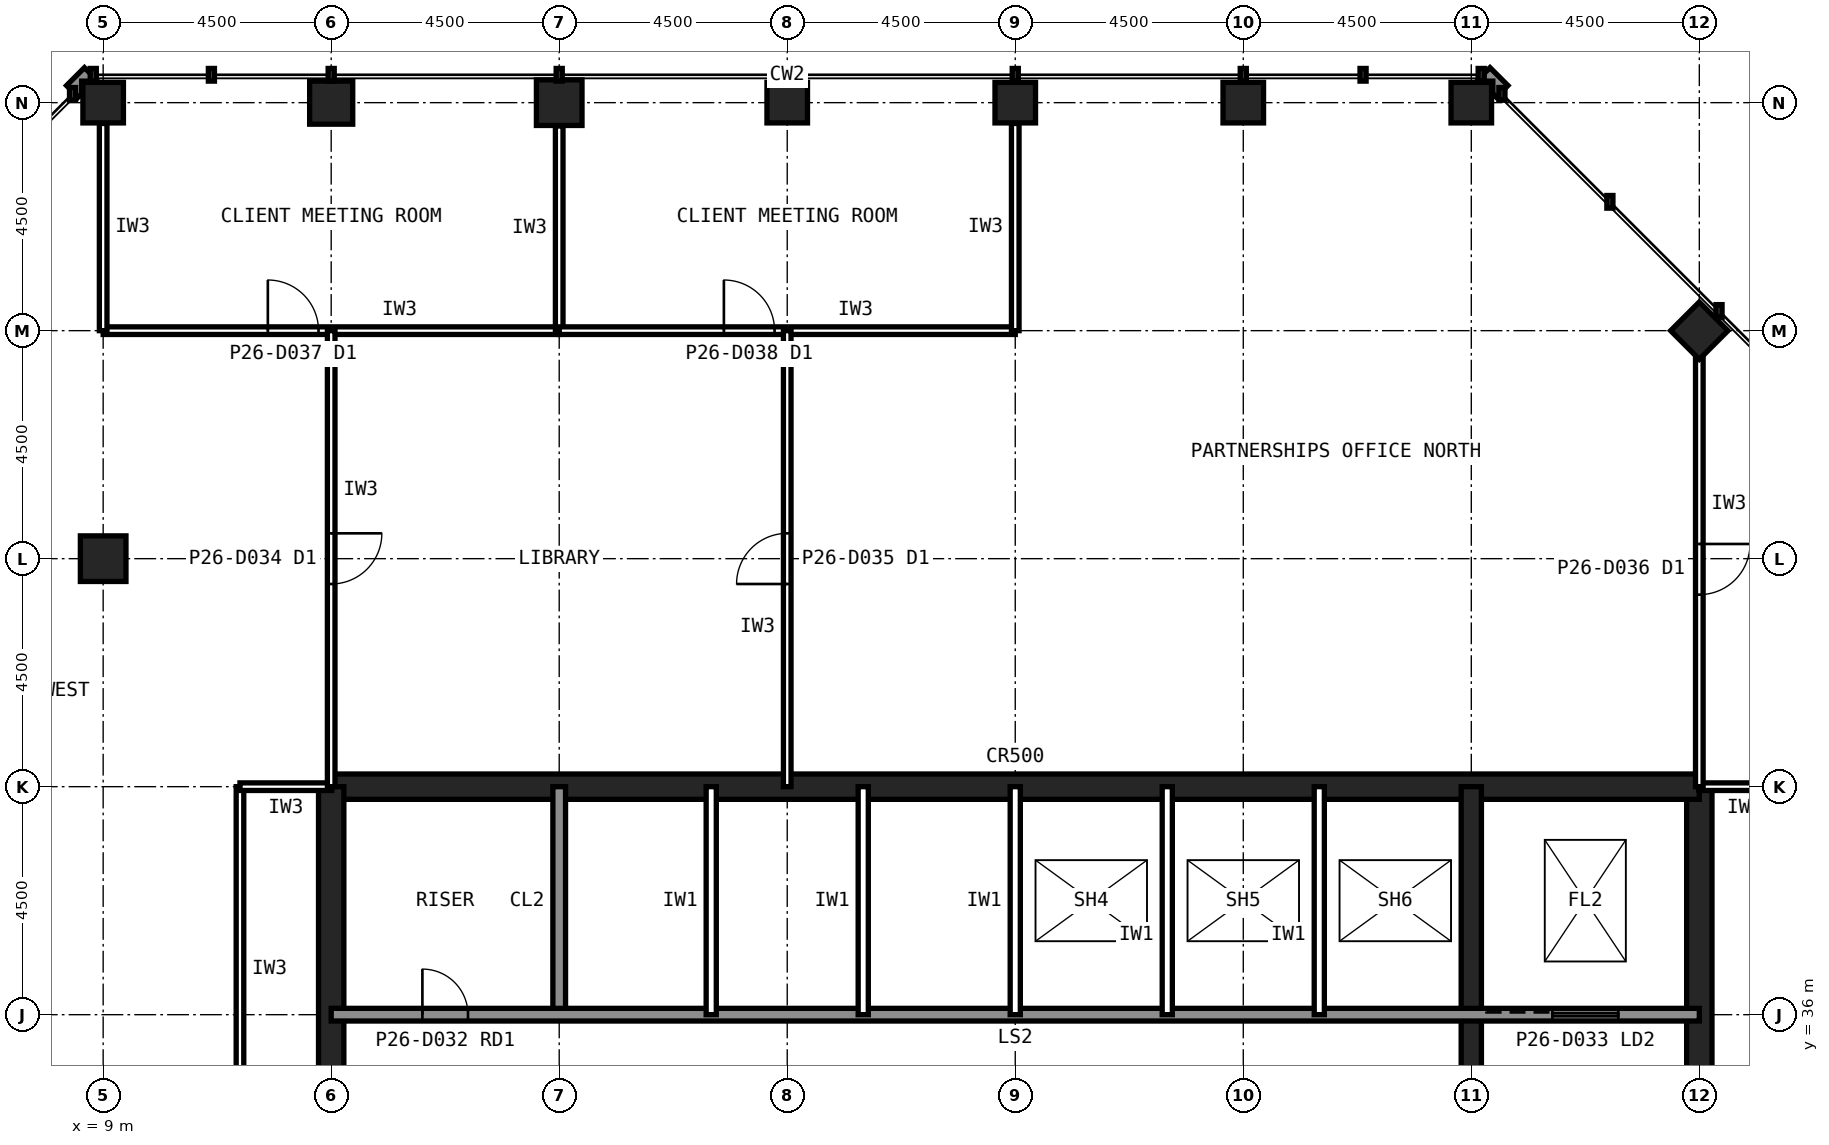
"""IFC4 building model, lengths in metres.
Left out: names, types, materials, properties, quantities, classifications, styles, units other than length and angle.
Written with IfcOpenShell. Run it as: python <this file> out.ifc"""

import sys

from ifc_helpers import new_model, si_unit, direction, frame, frame_2d, origin, origin_2d, place, context, subcontext, project, spatial, rectangle, hollow_rectangle, extrude, element, fill, save


model = new_model("IFC4")
c1 = context("Model", 3, precision=1e-05, world=origin(), true_north=direction((0.0, 1.0)))
c2 = subcontext(c1, "Body", "Model", "MODEL_VIEW")
j1 = project(units=[si_unit("LENGTHUNIT", "METRE"), si_unit("PLANEANGLEUNIT", "RADIAN")], contexts=[c1])
p1 = place(None, origin())
s1 = spatial("IfcSite", under=j1, at=p1, CompositionType="ELEMENT")
p2 = place(p1, origin())
s2 = spatial("IfcBuilding", under=s1, at=p2, CompositionType="ELEMENT")
p3 = place(p2, frame((0.0, 0.0, 115.6)))
s3 = spatial("IfcBuildingStorey", under=s2, at=p3, CompositionType="ELEMENT", Elevation=115.6)
for number, where, z_axis, x_axis in (
    (1, (36.0, 54.0, 0.0), (0.0, 0.0, 1.0), (1.0, 0.0, 0.0)),
    (2, (31.5, 54.0, 0.0), (0.0, 0.0, 1.0), (1.0, 0.0, 0.0)),
    (3, (27.0, 54.0, 0.0), (0.0, 0.0, 1.0), (1.0, 0.0, 0.0)),
    (4, (22.5, 54.0, 0.0), (0.0, 0.0, 1.0), (1.0, 0.0, 0.0)),
):
    element("IfcColumn", number, at=place(p3, frame(where, z_axis=z_axis, x_axis=x_axis)), inside=s3, PredefinedType="COLUMN", context=c2, shape_type="SweptSolid", body=[
        extrude(hollow_rectangle(XDim=0.8, YDim=0.8, WallThickness=0.045, at=origin_2d()), origin(), (0.0, 0.0, 1.0), 4.0),
    ])
p4 = place(p3, frame((18.0, 54.0, 0.0), z_axis=(0.0, 0.0, 1.0), x_axis=(1.0, 0.0, 0.0)))
e5 = element("IfcColumn", 5, at=p4, inside=s3, PredefinedType="COLUMN", context=c2, shape_type="SweptSolid", body=[
    extrude(hollow_rectangle(XDim=0.9, YDim=0.9, WallThickness=0.063, at=origin_2d()), origin(), (0.0, 0.0, 1.0), 4.0),
])
p5 = place(p3, frame((13.5, 54.0, 0.0), z_axis=(0.0, 0.0, 1.0), x_axis=(1.0, 0.0, 0.0)))
e6 = element("IfcColumn", 6, at=p5, inside=s3, PredefinedType="COLUMN", context=c2, shape_type="SweptSolid", body=[
    extrude(hollow_rectangle(XDim=0.85, YDim=0.85, WallThickness=0.05, at=origin_2d()), origin(), (0.0, 0.0, 1.0), 4.0),
])
for number, where, z_axis, x_axis in (
    (7, (9.0, 54.0, 0.0), (0.0, 0.0, 1.0), (1.0, 0.0, 0.0)),
    (8, (40.5, 49.5, 0.0), (0.0, 0.0, 1.0), (0.707, 0.707, 0.0)),
):
    element("IfcColumn", number, at=place(p3, frame(where, z_axis=z_axis, x_axis=x_axis)), inside=s3, PredefinedType="COLUMN", context=c2, shape_type="SweptSolid", body=[
        extrude(hollow_rectangle(XDim=0.8, YDim=0.8, WallThickness=0.045, at=origin_2d()), origin(), (0.0, 0.0, 1.0), 4.0),
    ])
p6 = place(p3, frame((9.0, 45.0, 0.0), z_axis=(0.0, 0.0, 1.0), x_axis=(1.0, 0.0, 0.0)))
e9 = element("IfcColumn", 9, at=p6, inside=s3, PredefinedType="COLUMN", context=c2, shape_type="SweptSolid", body=[
    extrude(hollow_rectangle(XDim=0.9, YDim=0.9, WallThickness=0.063, at=origin_2d()), origin(), (0.0, 0.0, 1.0), 4.0),
])
p7 = place(p3, frame((40.5, 13.5, 0.0), z_axis=(0.0, 0.0, 1.0), x_axis=(0.0, 1.0, 0.0)))
e10 = element("IfcWall", 10, at=p7, inside=s3, PredefinedType="SHEAR", context=c2, shape_type="SweptSolid", body=[
    extrude(rectangle(XDim=27.0, YDim=0.5, at=frame_2d((13.5, 0.0))), origin(), (0.0, 0.0, 1.0), 4.0),
])
p8 = place(p7, frame((5.85, 0.0, 0.0)))
e11 = element("IfcOpeningElement", 11, at=p8, cuts=e10, PredefinedType="OPENING", context=c2, shape_type="SweptSolid", body=[
    extrude(rectangle(XDim=1.8, YDim=2.1, at=frame_2d((0.9, 1.05))), frame((0.0, 0.26, 0.0), z_axis=(0.0, -1.0, 0.0), x_axis=(1.0, 0.0, 0.0)), (0.0, 0.0, 1.0), 0.52),
])
p9 = place(p7, frame((19.65, 0.0, 0.0)))
e12 = element("IfcOpeningElement", 12, at=p9, cuts=e10, PredefinedType="OPENING", context=c2, shape_type="SweptSolid", body=[
    extrude(rectangle(XDim=1.2, YDim=2.1, at=frame_2d((0.6, 1.05))), frame((0.0, 0.26, 0.0), z_axis=(0.0, -1.0, 0.0), x_axis=(1.0, 0.0, 0.0)), (0.0, 0.0, 1.0), 0.52),
])
p10 = place(p3, frame((40.5, 40.5, 0.0), z_axis=(0.0, 0.0, 1.0), x_axis=(-1.0, 0.0, 0.0)))
e13 = element("IfcWall", 13, at=p10, inside=s3, PredefinedType="SHEAR", context=c2, shape_type="SweptSolid", body=[
    extrude(rectangle(XDim=27.0, YDim=0.5, at=frame_2d((13.5, 0.0))), origin(), (0.0, 0.0, 1.0), 4.0),
])
p11 = place(p3, frame((13.5, 40.5, 0.0), z_axis=(0.0, 0.0, 1.0), x_axis=(0.0, -1.0, 0.0)))
e14 = element("IfcWall", 14, at=p11, inside=s3, PredefinedType="SHEAR", context=c2, shape_type="SweptSolid", body=[
    extrude(rectangle(XDim=27.0, YDim=0.5, at=frame_2d((13.5, 0.0))), origin(), (0.0, 0.0, 1.0), 4.0),
])
p12 = place(p11, frame((19.65, 0.0, 0.0)))
e15 = element("IfcOpeningElement", 15, at=p12, cuts=e14, PredefinedType="OPENING", context=c2, shape_type="SweptSolid", body=[
    extrude(rectangle(XDim=1.2, YDim=2.1, at=frame_2d((0.6, 1.05))), frame((0.0, 0.26, 0.0), z_axis=(0.0, -1.0, 0.0), x_axis=(1.0, 0.0, 0.0)), (0.0, 0.0, 1.0), 0.52),
])
p13 = place(p11, frame((5.85, 0.0, 0.0)))
e16 = element("IfcOpeningElement", 16, at=p13, cuts=e14, PredefinedType="OPENING", context=c2, shape_type="SweptSolid", body=[
    extrude(rectangle(XDim=1.8, YDim=2.1, at=frame_2d((0.9, 1.05))), frame((0.0, 0.26, 0.0), z_axis=(0.0, -1.0, 0.0), x_axis=(1.0, 0.0, 0.0)), (0.0, 0.0, 1.0), 0.52),
])
p14 = place(p3, frame((18.0, 36.0, 0.0), z_axis=(0.0, 0.0, 1.0), x_axis=(0.0, 1.0, 0.0)))
e17 = element("IfcWall", 17, at=p14, inside=s3, PredefinedType="SOLIDWALL", context=c2, shape_type="SweptSolid", body=[
    extrude(rectangle(XDim=4.5, YDim=0.25, at=frame_2d((2.25, 0.0))), origin(), (0.0, 0.0, 1.0), 3.84),
])
p15 = place(p3, frame((36.0, 22.5, 0.0), z_axis=(0.0, 0.0, 1.0), x_axis=(0.0, 1.0, 0.0)))
e18 = element("IfcWall", 18, at=p15, inside=s3, PredefinedType="SHEAR", context=c2, shape_type="SweptSolid", body=[
    extrude(rectangle(XDim=18.0, YDim=0.4, at=frame_2d((9.0, 0.0))), origin(), (0.0, 0.0, 1.0), 4.0),
])
p16 = place(p3, frame((13.5, 36.0, 0.0), z_axis=(0.0, 0.0, 1.0), x_axis=(1.0, 0.0, 0.0)))
e19 = element("IfcWall", 19, at=p16, inside=s3, PredefinedType="SOLIDWALL", context=c2, shape_type="SweptSolid", body=[
    extrude(rectangle(XDim=27.0, YDim=0.25, at=frame_2d((13.5, 0.0))), origin(), (0.0, 0.0, 1.0), 3.84),
])
p17 = place(p16, frame((1.8, 0.0, 0.0)))
e20 = element("IfcOpeningElement", 20, at=p17, cuts=e19, PredefinedType="OPENING", context=c2, shape_type="SweptSolid", body=[
    extrude(rectangle(XDim=0.9, YDim=2.1, at=frame_2d((0.45, 1.05))), frame((0.0, 0.135, 0.0), z_axis=(0.0, -1.0, 0.0), x_axis=(1.0, 0.0, 0.0)), (0.0, 0.0, 1.0), 0.27),
])
p18 = place(p16, frame((24.1, 0.0, 0.0)))
e21 = element("IfcOpeningElement", 21, at=p18, cuts=e19, PredefinedType="OPENING", context=c2, shape_type="SweptSolid", body=[
    extrude(rectangle(XDim=1.3, YDim=2.2, at=frame_2d((0.65, 1.1))), frame((0.0, 0.135, 0.0), z_axis=(0.0, -1.0, 0.0), x_axis=(1.0, 0.0, 0.0)), (0.0, 0.0, 1.0), 0.27),
])
for number, where, z_axis, x_axis in (
    (22, (21.0, 36.0, 0.0), (0.0, 0.0, 1.0), (0.0, 1.0, 0.0)),
    (23, (24.0, 36.0, 0.0), (0.0, 0.0, 1.0), (0.0, 1.0, 0.0)),
    (24, (27.0, 36.0, 0.0), (0.0, 0.0, 1.0), (0.0, 1.0, 0.0)),
    (25, (30.0, 36.0, 0.0), (0.0, 0.0, 1.0), (0.0, 1.0, 0.0)),
    (26, (33.0, 36.0, 0.0), (0.0, 0.0, 1.0), (0.0, 1.0, 0.0)),
):
    element("IfcWall", number, at=place(p3, frame(where, z_axis=z_axis, x_axis=x_axis)), inside=s3, PredefinedType="PARTITIONING", context=c2, shape_type="SweptSolid", body=[
        extrude(rectangle(XDim=4.5, YDim=0.2, at=frame_2d((2.25, 0.0))), origin(), (0.0, 0.0, 1.0), 3.84),
    ])
p19 = place(p3, frame((11.7, 40.5, 0.0), z_axis=(0.0, 0.0, 1.0), x_axis=(0.0, -1.0, 0.0)))
e27 = element("IfcWall", 27, at=p19, inside=s3, PredefinedType="PARTITIONING", context=c2, shape_type="SweptSolid", body=[
    extrude(rectangle(XDim=7.2, YDim=0.15, at=frame_2d((3.6, 0.0))), origin(), (0.0, 0.0, 1.0), 3.84),
])
for number, where, z_axis, x_axis in (
    (28, (13.51, 40.5, 0.0), (0.0, 0.0, 1.0), (-1.0, 0.0, 0.0)),
    (29, (42.3, 40.5, 0.0), (0.0, 0.0, 1.0), (-1.0, 0.0, 0.0)),
):
    element("IfcWall", number, at=place(p3, frame(where, z_axis=z_axis, x_axis=x_axis)), inside=s3, PredefinedType="PARTITIONING", context=c2, shape_type="SweptSolid", body=[
        extrude(rectangle(XDim=1.81, YDim=0.15, at=frame_2d((0.905, 0.0))), origin(), (0.0, 0.0, 1.0), 2.989),
    ])
p20 = place(p3, frame((9.0, 49.5, 0.0), z_axis=(0.0, 0.0, 1.0), x_axis=(1.0, 0.0, 0.0)))
e30 = element("IfcWall", 30, at=p20, inside=s3, PredefinedType="PARTITIONING", context=c2, shape_type="SweptSolid", body=[
    extrude(rectangle(XDim=9.0, YDim=0.15, at=frame_2d((4.5, 0.0))), origin(), (0.0, 0.0, 1.0), 3.84),
])
p21 = place(p20, frame((3.25, 0.0, 0.0)))
e31 = element("IfcOpeningElement", 31, at=p21, cuts=e30, PredefinedType="OPENING", context=c2, shape_type="SweptSolid", body=[
    extrude(rectangle(XDim=1.0, YDim=2.1, at=frame_2d((0.5, 1.05))), frame((0.0, 0.085, 0.0), z_axis=(0.0, -1.0, 0.0), x_axis=(1.0, 0.0, 0.0)), (0.0, 0.0, 1.0), 0.17),
])
p22 = place(p3, frame((18.0, 49.5, 0.0), z_axis=(0.0, 0.0, 1.0), x_axis=(0.0, 1.0, 0.0)))
e32 = element("IfcWall", 32, at=p22, inside=s3, PredefinedType="PARTITIONING", context=c2, shape_type="SweptSolid", body=[
    extrude(rectangle(XDim=4.04, YDim=0.15, at=frame_2d((2.02, 0.0))), origin(), (0.0, 0.0, 1.0), 2.989),
])
p23 = place(p3, frame((9.0, 53.59, 0.0), z_axis=(0.0, 0.0, 1.0), x_axis=(0.0, -1.0, 0.0)))
e33 = element("IfcWall", 33, at=p23, inside=s3, PredefinedType="PARTITIONING", context=c2, shape_type="SweptSolid", body=[
    extrude(rectangle(XDim=4.09, YDim=0.15, at=frame_2d((2.045, 0.0))), origin(), (0.0, 0.0, 1.0), 3.229),
])
p24 = place(p3, frame((18.0, 49.5, 0.0), z_axis=(0.0, 0.0, 1.0), x_axis=(1.0, 0.0, 0.0)))
e34 = element("IfcWall", 34, at=p24, inside=s3, PredefinedType="PARTITIONING", context=c2, shape_type="SweptSolid", body=[
    extrude(rectangle(XDim=9.0, YDim=0.15, at=frame_2d((4.5, 0.0))), origin(), (0.0, 0.0, 1.0), 3.84),
])
p25 = place(p24, frame((3.25, 0.0, 0.0)))
e35 = element("IfcOpeningElement", 35, at=p25, cuts=e34, PredefinedType="OPENING", context=c2, shape_type="SweptSolid", body=[
    extrude(rectangle(XDim=1.0, YDim=2.1, at=frame_2d((0.5, 1.05))), frame((0.0, 0.085, 0.0), z_axis=(0.0, -1.0, 0.0), x_axis=(1.0, 0.0, 0.0)), (0.0, 0.0, 1.0), 0.17),
])
p26 = place(p3, frame((27.0, 49.5, 0.0), z_axis=(0.0, 0.0, 1.0), x_axis=(0.0, 1.0, 0.0)))
e36 = element("IfcWall", 36, at=p26, inside=s3, PredefinedType="PARTITIONING", context=c2, shape_type="SweptSolid", body=[
    extrude(rectangle(XDim=4.09, YDim=0.15, at=frame_2d((2.045, 0.0))), origin(), (0.0, 0.0, 1.0), 2.989),
])
p27 = place(p3, frame((40.5, 49.08, 0.0), z_axis=(0.0, 0.0, 1.0), x_axis=(0.0, -1.0, 0.0)))
e37 = element("IfcWall", 37, at=p27, inside=s3, PredefinedType="PARTITIONING", context=c2, shape_type="SweptSolid", body=[
    extrude(rectangle(XDim=8.58, YDim=0.15, at=frame_2d((4.29, 0.0))), origin(), (0.0, 0.0, 1.0), 2.989),
])
p28 = place(p27, frame((3.79, 0.0, 0.0)))
e38 = element("IfcOpeningElement", 38, at=p28, cuts=e37, PredefinedType="OPENING", context=c2, shape_type="SweptSolid", body=[
    extrude(rectangle(XDim=1.0, YDim=2.1, at=frame_2d((0.5, 1.05))), frame((0.0, 0.085, 0.0), z_axis=(0.0, -1.0, 0.0), x_axis=(1.0, 0.0, 0.0)), (0.0, 0.0, 1.0), 0.17),
])
p29 = place(p3, frame((22.5, 40.5, 0.0), z_axis=(0.0, 0.0, 1.0), x_axis=(0.0, 1.0, 0.0)))
e39 = element("IfcWall", 39, at=p29, inside=s3, PredefinedType="PARTITIONING", context=c2, shape_type="SweptSolid", body=[
    extrude(rectangle(XDim=9.0, YDim=0.15, at=frame_2d((4.5, 0.0))), origin(), (0.0, 0.0, 1.0), 2.989),
])
p30 = place(p29, frame((4.0, 0.0, 0.0)))
e40 = element("IfcOpeningElement", 40, at=p30, cuts=e39, PredefinedType="OPENING", context=c2, shape_type="SweptSolid", body=[
    extrude(rectangle(XDim=1.0, YDim=2.1, at=frame_2d((0.5, 1.05))), frame((0.0, 0.085, 0.0), z_axis=(0.0, -1.0, 0.0), x_axis=(1.0, 0.0, 0.0)), (0.0, 0.0, 1.0), 0.17),
])
p31 = place(p3, frame((13.5, 49.5, 0.0), z_axis=(0.0, 0.0, 1.0), x_axis=(0.0, -1.0, 0.0)))
e41 = element("IfcWall", 41, at=p31, inside=s3, PredefinedType="PARTITIONING", context=c2, shape_type="SweptSolid", body=[
    extrude(rectangle(XDim=9.0, YDim=0.15, at=frame_2d((4.5, 0.0))), origin(), (0.0, 0.0, 1.0), 2.989),
])
p32 = place(p31, frame((4.0, 0.0, 0.0)))
e42 = element("IfcOpeningElement", 42, at=p32, cuts=e41, PredefinedType="OPENING", context=c2, shape_type="SweptSolid", body=[
    extrude(rectangle(XDim=1.0, YDim=2.1, at=frame_2d((0.5, 1.05))), frame((0.0, 0.085, 0.0), z_axis=(0.0, -1.0, 0.0), x_axis=(1.0, 0.0, 0.0)), (0.0, 0.0, 1.0), 0.17),
])
p33 = place(p17, origin())
e43 = element("IfcDoor", 43, at=p33, inside=s3, OperationType="SINGLE_SWING_LEFT", PredefinedType="DOOR", context=c2, shape_type="SweptSolid", body=[
    extrude(rectangle(XDim=0.9, YDim=2.1, at=frame_2d((0.45, 1.05))), frame((0.0, 0.025, 0.0), z_axis=(0.0, -1.0, 0.0), x_axis=(1.0, 0.0, 0.0)), (0.0, 0.0, 1.0), 0.05),
])
fill(e20, e43)
p34 = place(p18, origin())
e44 = element("IfcDoor", 44, at=p34, inside=s3, OperationType="SLIDING_TO_LEFT", PredefinedType="DOOR", context=c2, shape_type="SweptSolid", body=[
    extrude(rectangle(XDim=1.3, YDim=2.2, at=frame_2d((0.65, 1.1))), frame((0.0, 0.025, 0.0), z_axis=(0.0, -1.0, 0.0), x_axis=(1.0, 0.0, 0.0)), (0.0, 0.0, 1.0), 0.05),
])
fill(e21, e44)
p35 = place(p21, origin())
e45 = element("IfcDoor", 45, at=p35, inside=s3, OperationType="SINGLE_SWING_LEFT", PredefinedType="DOOR", context=c2, shape_type="SweptSolid", body=[
    extrude(rectangle(XDim=1.0, YDim=2.1, at=frame_2d((0.5, 1.05))), frame((0.0, 0.025, 0.0), z_axis=(0.0, -1.0, 0.0), x_axis=(1.0, 0.0, 0.0)), (0.0, 0.0, 1.0), 0.05),
])
fill(e31, e45)
p36 = place(p25, origin())
e46 = element("IfcDoor", 46, at=p36, inside=s3, OperationType="SINGLE_SWING_LEFT", PredefinedType="DOOR", context=c2, shape_type="SweptSolid", body=[
    extrude(rectangle(XDim=1.0, YDim=2.1, at=frame_2d((0.5, 1.05))), frame((0.0, 0.025, 0.0), z_axis=(0.0, -1.0, 0.0), x_axis=(1.0, 0.0, 0.0)), (0.0, 0.0, 1.0), 0.05),
])
fill(e35, e46)
p37 = place(p28, origin())
e47 = element("IfcDoor", 47, at=p37, inside=s3, OperationType="SINGLE_SWING_LEFT", PredefinedType="DOOR", context=c2, shape_type="SweptSolid", body=[
    extrude(rectangle(XDim=1.0, YDim=2.1, at=frame_2d((0.5, 1.05))), frame((0.0, 0.025, 0.0), z_axis=(0.0, -1.0, 0.0), x_axis=(1.0, 0.0, 0.0)), (0.0, 0.0, 1.0), 0.05),
])
fill(e38, e47)
p38 = place(p30, origin())
e48 = element("IfcDoor", 48, at=p38, inside=s3, OperationType="SINGLE_SWING_LEFT", PredefinedType="DOOR", context=c2, shape_type="SweptSolid", body=[
    extrude(rectangle(XDim=1.0, YDim=2.1, at=frame_2d((0.5, 1.05))), frame((0.0, 0.025, 0.0), z_axis=(0.0, -1.0, 0.0), x_axis=(1.0, 0.0, 0.0)), (0.0, 0.0, 1.0), 0.05),
])
fill(e40, e48)
p39 = place(p32, origin())
e49 = element("IfcDoor", 49, at=p39, inside=s3, OperationType="SINGLE_SWING_LEFT", PredefinedType="DOOR", context=c2, shape_type="SweptSolid", body=[
    extrude(rectangle(XDim=1.0, YDim=2.1, at=frame_2d((0.5, 1.05))), frame((0.0, 0.025, 0.0), z_axis=(0.0, -1.0, 0.0), x_axis=(1.0, 0.0, 0.0)), (0.0, 0.0, 1.0), 0.05),
])
fill(e42, e49)
save(model, sys.argv[1])
